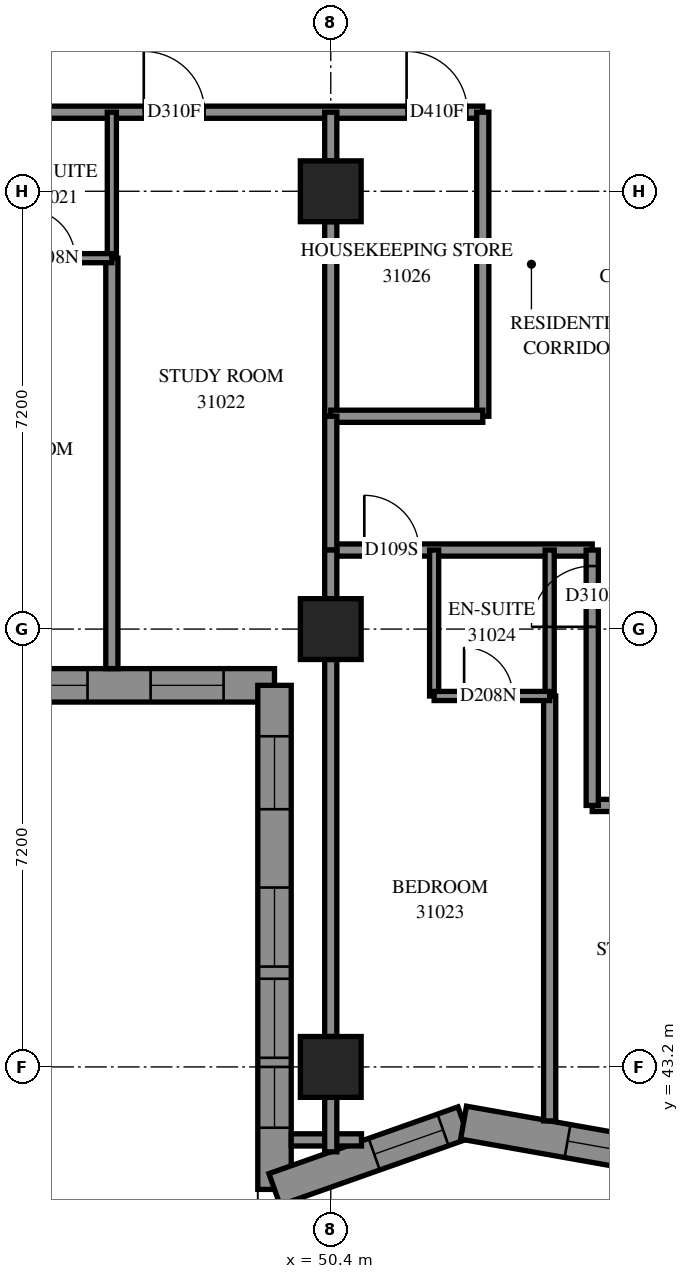
"""IFC4 building model, lengths in metres.
Left out: names, types, materials, properties, quantities, classifications, styles, units other than length and angle.
Written with IfcOpenShell. Run it as: python <this file> out.ifc"""

import sys

from ifc_helpers import new_model, si_unit, direction, frame, frame_2d, origin, origin_2d, place, context, subcontext, project, spatial, polyline, rectangle, outline, extrude, element, fill, save


model = new_model("IFC4")
c1 = context("Model", 3, precision=1e-05, world=origin(), true_north=direction((0.0, 1.0)))
c2 = subcontext(c1, "Body", "Model", "MODEL_VIEW")
j1 = project(units=[si_unit("LENGTHUNIT", "METRE"), si_unit("PLANEANGLEUNIT", "RADIAN")], contexts=[c1])
p1 = place(None, origin())
s1 = spatial("IfcSite", under=j1, at=p1, CompositionType="ELEMENT")
p2 = place(p1, origin())
s2 = spatial("IfcBuilding", under=s1, at=p2, CompositionType="ELEMENT")
p3 = place(p2, frame((0.0, 0.0, 115.2)))
s3 = spatial("IfcBuildingStorey", under=s2, at=p3, CompositionType="ELEMENT", Elevation=115.2)
for number, where, z_axis, x_axis in (
    (1, (50.4, 43.2, 0.0), (0.0, 0.0, 1.0), (1.0, 0.0, 0.0)),
    (2, (50.4, 50.4, 0.0), (0.0, 0.0, 1.0), (1.0, 0.0, 0.0)),
    (3, (50.4, 57.6, 0.0), (0.0, 0.0, 1.0), (1.0, 0.0, 0.0)),
):
    element("IfcColumn", number, at=place(p3, frame(where, z_axis=z_axis, x_axis=x_axis)), inside=s3, PredefinedType="COLUMN", context=c2, shape_type="SweptSolid", body=[
        extrude(rectangle(XDim=1.0, YDim=1.0, at=origin_2d()), origin(), (0.0, 0.0, 1.0), 3.1),
    ])
p4 = place(p3, frame((42.275, 49.475, 0.0), z_axis=(0.0, 0.0, 1.0), x_axis=(1.0, 0.0, 0.0)))
e4 = element("IfcWall", 4, at=p4, inside=s3, PredefinedType="SOLIDWALL", context=c2, shape_type="SweptSolid", body=[
    extrude(outline(polyline([(-0.275, -0.275), (6.925, -0.275), (7.475, 0.275), (0.275, 0.275), (-0.275, -0.275)])), origin(), (0.0, 0.0, 1.0), 3.1),
])
p5 = place(p4, frame((1.325, 0.0, 0.5)))
e5 = element("IfcOpeningElement", 5, at=p5, cuts=e4, PredefinedType="OPENING", context=c2, shape_type="SweptSolid", body=[
    extrude(rectangle(XDim=1.3, YDim=2.45, at=frame_2d((0.65, 1.225))), frame((0.0, 0.285, 0.0), z_axis=(0.0, -1.0, 0.0), x_axis=(1.0, 0.0, 0.0)), (0.0, 0.0, 1.0), 0.57),
])
p6 = place(p4, frame((2.825, 0.0, 0.5)))
e6 = element("IfcOpeningElement", 6, at=p6, cuts=e4, PredefinedType="OPENING", context=c2, shape_type="SweptSolid", body=[
    extrude(rectangle(XDim=1.3, YDim=2.45, at=frame_2d((0.65, 1.225))), frame((0.0, 0.285, 0.0), z_axis=(0.0, -1.0, 0.0), x_axis=(1.0, 0.0, 0.0)), (0.0, 0.0, 1.0), 0.57),
])
p7 = place(p4, frame((5.162, 0.0, 0.5)))
e7 = element("IfcOpeningElement", 7, at=p7, cuts=e4, PredefinedType="OPENING", context=c2, shape_type="SweptSolid", body=[
    extrude(rectangle(XDim=1.2, YDim=2.45, at=frame_2d((0.6, 1.225))), frame((0.0, 0.285, 0.0), z_axis=(0.0, -1.0, 0.0), x_axis=(1.0, 0.0, 0.0)), (0.0, 0.0, 1.0), 0.57),
])
p8 = place(p3, frame((49.475, 49.475, 0.0), z_axis=(0.0, 0.0, 1.0), x_axis=(0.0, -1.0, 0.0)))
e8 = element("IfcWall", 8, at=p8, inside=s3, PredefinedType="SOLIDWALL", context=c2, shape_type="SweptSolid", body=[
    extrude(outline(polyline([(0.275, -0.275), (8.678, -0.275), (7.901, 0.275), (-0.275, 0.275), (0.275, -0.275)])), origin(), (0.0, 0.0, 1.0), 3.1),
])
p9 = place(p8, frame((3.325, 0.0, 0.5)))
e9 = element("IfcOpeningElement", 9, at=p9, cuts=e8, PredefinedType="OPENING", context=c2, shape_type="SweptSolid", body=[
    extrude(rectangle(XDim=1.3, YDim=2.45, at=frame_2d((0.65, 1.225))), frame((0.0, 0.285, 0.0), z_axis=(0.0, -1.0, 0.0), x_axis=(1.0, 0.0, 0.0)), (0.0, 0.0, 1.0), 0.57),
])
p10 = place(p8, frame((4.825, 0.0, 0.5)))
e10 = element("IfcOpeningElement", 10, at=p10, cuts=e8, PredefinedType="OPENING", context=c2, shape_type="SweptSolid", body=[
    extrude(rectangle(XDim=1.3, YDim=2.45, at=frame_2d((0.65, 1.225))), frame((0.0, 0.285, 0.0), z_axis=(0.0, -1.0, 0.0), x_axis=(1.0, 0.0, 0.0)), (0.0, 0.0, 1.0), 0.57),
])
p11 = place(p8, frame((0.838, 0.0, 0.5)))
e11 = element("IfcOpeningElement", 11, at=p11, cuts=e8, PredefinedType="OPENING", context=c2, shape_type="SweptSolid", body=[
    extrude(rectangle(XDim=1.2, YDim=2.45, at=frame_2d((0.6, 1.225))), frame((0.0, 0.285, 0.0), z_axis=(0.0, -1.0, 0.0), x_axis=(1.0, 0.0, 0.0)), (0.0, 0.0, 1.0), 0.57),
])
p12 = place(p8, frame((6.275, 0.0, 0.45)))
e12 = element("IfcOpeningElement", 12, at=p12, cuts=e8, PredefinedType="OPENING", context=c2, shape_type="SweptSolid", body=[
    extrude(rectangle(XDim=1.0, YDim=2.5, at=frame_2d((0.5, 1.25))), frame((0.0, 0.285, 0.0), z_axis=(0.0, -1.0, 0.0), x_axis=(1.0, 0.0, 0.0)), (0.0, 0.0, 1.0), 0.57),
])
p13 = place(p3, frame((49.475, 41.186, 0.0), z_axis=(0.0, 0.0, 1.0), x_axis=(0.9429483298, 0.3329391044, 0.0)))
e13 = element("IfcWall", 13, at=p13, inside=s3, PredefinedType="SOLIDWALL", context=c2, shape_type="SweptSolid", body=[
    extrude(outline(polyline([(-0.389, -0.275), (3.225, -0.275), (3.369, 0.275), (0.389, 0.275), (-0.389, -0.275)])), origin(), (0.0, 0.0, 1.0), 3.1),
])
p14 = place(p13, frame((1.739, 0.0, 0.5)))
e14 = element("IfcOpeningElement", 14, at=p14, cuts=e13, PredefinedType="OPENING", context=c2, shape_type="SweptSolid", body=[
    extrude(rectangle(XDim=1.2, YDim=2.45, at=frame_2d((0.6, 1.225))), frame((0.0, 0.285, 0.0), z_axis=(0.0, -1.0, 0.0), x_axis=(1.0, 0.0, 0.0)), (0.0, 0.0, 1.0), 0.57),
])
p15 = place(p3, frame((52.584, 42.283, 0.0), z_axis=(0.0, 0.0, 1.0), x_axis=(0.9846990638, -0.1742634606, 0.0)))
e15 = element("IfcWall", 15, at=p15, inside=s3, PredefinedType="SOLIDWALL", context=c2, shape_type="SweptSolid", body=[
    extrude(outline(polyline([(0.072, -0.275), (3.533, -0.275), (3.435, 0.275), (-0.072, 0.275), (0.072, -0.275)])), origin(), (0.0, 0.0, 1.0), 3.1),
])
p16 = place(p15, frame((1.737, 0.0, 0.5)))
e16 = element("IfcOpeningElement", 16, at=p16, cuts=e15, PredefinedType="OPENING", context=c2, shape_type="SweptSolid", body=[
    extrude(rectangle(XDim=1.2, YDim=2.45, at=frame_2d((0.6, 1.225))), frame((0.0, 0.285, 0.0), z_axis=(0.0, -1.0, 0.0), x_axis=(1.0, 0.0, 0.0)), (0.0, 0.0, 1.0), 0.57),
])
p17 = place(p3, frame((28.802, 58.9, 0.0), z_axis=(0.0, 0.0, 1.0), x_axis=(1.0, 0.0, 0.0)))
e17 = element("IfcWall", 17, at=p17, inside=s3, PredefinedType="PARTITIONING", context=c2, shape_type="SweptSolid", body=[
    extrude(rectangle(XDim=24.098, YDim=0.2, at=frame_2d((12.049, 0.0))), origin(), (0.0, 0.0, 1.0), 3.1),
])
p18 = place(p17, frame((11.323, 0.0, 0.0)))
e18 = element("IfcOpeningElement", 18, at=p18, cuts=e17, PredefinedType="OPENING", context=c2, shape_type="SweptSolid", body=[
    extrude(rectangle(XDim=1.0, YDim=2.1, at=frame_2d((0.5, 1.05))), frame((0.0, 0.11, 0.0), z_axis=(0.0, -1.0, 0.0), x_axis=(1.0, 0.0, 0.0)), (0.0, 0.0, 1.0), 0.22),
])
p19 = place(p17, frame((14.908, 0.0, 0.0)))
e19 = element("IfcOpeningElement", 19, at=p19, cuts=e17, PredefinedType="OPENING", context=c2, shape_type="SweptSolid", body=[
    extrude(rectangle(XDim=0.9, YDim=2.1, at=frame_2d((0.45, 1.05))), frame((0.0, 0.11, 0.0), z_axis=(0.0, -1.0, 0.0), x_axis=(1.0, 0.0, 0.0)), (0.0, 0.0, 1.0), 0.22),
])
p20 = place(p17, frame((18.523, 0.0, 0.0)))
e20 = element("IfcOpeningElement", 20, at=p20, cuts=e17, PredefinedType="OPENING", context=c2, shape_type="SweptSolid", body=[
    extrude(rectangle(XDim=1.0, YDim=2.1, at=frame_2d((0.5, 1.05))), frame((0.0, 0.11, 0.0), z_axis=(0.0, -1.0, 0.0), x_axis=(1.0, 0.0, 0.0)), (0.0, 0.0, 1.0), 0.22),
])
p21 = place(p17, frame((22.845, 0.0, 0.0)))
e21 = element("IfcOpeningElement", 21, at=p21, cuts=e17, PredefinedType="OPENING", context=c2, shape_type="SweptSolid", body=[
    extrude(rectangle(XDim=1.0, YDim=2.1, at=frame_2d((0.5, 1.05))), frame((0.0, 0.11, 0.0), z_axis=(0.0, -1.0, 0.0), x_axis=(1.0, 0.0, 0.0)), (0.0, 0.0, 1.0), 0.22),
])
p22 = place(p3, frame((54.7, 47.5, 0.0), z_axis=(0.0, 0.0, 1.0), x_axis=(1.0, 0.0, 0.0)))
e22 = element("IfcWall", 22, at=p22, inside=s3, PredefinedType="PARTITIONING", context=c2, shape_type="SweptSolid", body=[
    extrude(rectangle(XDim=19.442, YDim=0.2, at=frame_2d((9.721, 0.0))), origin(), (0.0, 0.0, 1.0), 3.1),
])
p23 = place(p22, frame((5.2, 0.0, 0.0)))
e23 = element("IfcOpeningElement", 23, at=p23, cuts=e22, PredefinedType="OPENING", context=c2, shape_type="SweptSolid", body=[
    extrude(rectangle(XDim=0.9, YDim=2.1, at=frame_2d((0.45, 1.05))), frame((0.0, 0.11, 0.0), z_axis=(0.0, -1.0, 0.0), x_axis=(1.0, 0.0, 0.0)), (0.0, 0.0, 1.0), 0.22),
])
p24 = place(p22, frame((8.757, 0.0, 0.0)))
e24 = element("IfcOpeningElement", 24, at=p24, cuts=e22, PredefinedType="OPENING", context=c2, shape_type="SweptSolid", body=[
    extrude(rectangle(XDim=0.9, YDim=2.1, at=frame_2d((0.45, 1.05))), frame((0.0, 0.11, 0.0), z_axis=(0.0, -1.0, 0.0), x_axis=(1.0, 0.0, 0.0)), (0.0, 0.0, 1.0), 0.22),
])
p25 = place(p22, frame((14.05, 0.0, 0.0)))
e25 = element("IfcOpeningElement", 25, at=p25, cuts=e22, PredefinedType="OPENING", context=c2, shape_type="SweptSolid", body=[
    extrude(rectangle(XDim=0.9, YDim=2.1, at=frame_2d((0.45, 1.05))), frame((0.0, 0.11, 0.0), z_axis=(0.0, -1.0, 0.0), x_axis=(1.0, 0.0, 0.0)), (0.0, 0.0, 1.0), 0.22),
])
p26 = place(p3, frame((54.0, 42.312, 0.0), z_axis=(0.0, 0.0, 1.0), x_axis=(0.0, 1.0, 0.0)))
e26 = element("IfcWall", 26, at=p26, inside=s3, PredefinedType="PARTITIONING", context=c2, shape_type="SweptSolid", body=[
    extrude(rectangle(XDim=6.988, YDim=0.2, at=frame_2d((3.494, 0.0))), origin(), (0.0, 0.0, 1.0), 3.1),
])
p27 = place(p3, frame((46.8, 49.75, 0.0), z_axis=(0.0, 0.0, 1.0), x_axis=(0.0, 1.0, 0.0)))
e27 = element("IfcWall", 27, at=p27, inside=s3, PredefinedType="PARTITIONING", context=c2, shape_type="SweptSolid", body=[
    extrude(rectangle(XDim=6.75, YDim=0.2, at=frame_2d((3.375, 0.0))), origin(), (0.0, 0.0, 1.0), 3.1),
])
p28 = place(p3, frame((50.4, 43.7, 0.0), z_axis=(0.0, 0.0, 1.0), x_axis=(0.0, 1.0, 0.0)))
e28 = element("IfcWall", 28, at=p28, inside=s3, PredefinedType="PARTITIONING", context=c2, shape_type="SweptSolid", body=[
    extrude(rectangle(XDim=6.2, YDim=0.2, at=frame_2d((3.1, 0.0))), origin(), (0.0, 0.0, 1.0), 2.6),
])
p29 = place(p3, frame((52.9, 53.9, 0.0), z_axis=(0.0, 0.0, 1.0), x_axis=(0.0, 1.0, 0.0)))
e29 = element("IfcWall", 29, at=p29, inside=s3, PredefinedType="PARTITIONING", context=c2, shape_type="SweptSolid", body=[
    extrude(rectangle(XDim=5.0, YDim=0.2, at=frame_2d((2.5, 0.0))), origin(), (0.0, 0.0, 1.0), 3.1),
])
p30 = place(p3, frame((50.4, 51.7, 0.0), z_axis=(0.0, 0.0, 1.0), x_axis=(1.0, 0.0, 0.0)))
e30 = element("IfcWall", 30, at=p30, inside=s3, PredefinedType="PARTITIONING", context=c2, shape_type="SweptSolid", body=[
    extrude(rectangle(XDim=4.3, YDim=0.2, at=frame_2d((2.15, 0.0))), origin(), (0.0, 0.0, 1.0), 3.1),
])
p31 = place(p30, frame((0.552, 0.0, 0.0)))
e31 = element("IfcOpeningElement", 31, at=p31, cuts=e30, PredefinedType="OPENING", context=c2, shape_type="SweptSolid", body=[
    extrude(rectangle(XDim=0.9, YDim=2.1, at=frame_2d((0.45, 1.05))), frame((0.0, 0.11, 0.0), z_axis=(0.0, -1.0, 0.0), x_axis=(1.0, 0.0, 0.0)), (0.0, 0.0, 1.0), 0.22),
])
p32 = place(p3, frame((54.7, 47.5, 0.0), z_axis=(0.0, 0.0, 1.0), x_axis=(0.0, 1.0, 0.0)))
e32 = element("IfcWall", 32, at=p32, inside=s3, PredefinedType="PARTITIONING", context=c2, shape_type="SweptSolid", body=[
    extrude(rectangle(XDim=4.2, YDim=0.2, at=frame_2d((2.1, 0.0))), origin(), (0.0, 0.0, 1.0), 3.1),
])
p33 = place(p32, frame((2.937, 0.0, 0.0)))
e33 = element("IfcOpeningElement", 33, at=p33, cuts=e32, PredefinedType="OPENING", context=c2, shape_type="SweptSolid", body=[
    extrude(rectangle(XDim=1.0, YDim=2.1, at=frame_2d((0.5, 1.05))), frame((0.0, 0.11, 0.0), z_axis=(0.0, -1.0, 0.0), x_axis=(1.0, 0.0, 0.0)), (0.0, 0.0, 1.0), 0.22),
])
p34 = place(p3, frame((50.4, 53.9, 0.0), z_axis=(0.0, 0.0, 1.0), x_axis=(0.0, 1.0, 0.0)))
e34 = element("IfcWall", 34, at=p34, inside=s3, PredefinedType="PARTITIONING", context=c2, shape_type="SweptSolid", body=[
    extrude(rectangle(XDim=3.2, YDim=0.2, at=frame_2d((1.6, 0.0))), origin(), (0.0, 0.0, 1.0), 3.1),
])
p35 = place(p3, frame((50.4, 53.9, 0.0), z_axis=(0.0, 0.0, 1.0), x_axis=(1.0, 0.0, 0.0)))
e35 = element("IfcWall", 35, at=p35, inside=s3, PredefinedType="PARTITIONING", context=c2, shape_type="SweptSolid", body=[
    extrude(rectangle(XDim=2.5, YDim=0.2, at=frame_2d((1.25, 0.0))), origin(), (0.0, 0.0, 1.0), 3.1),
])
for number, where, z_axis, x_axis in (
    (36, (52.1, 49.3, 0.0), (0.0, 0.0, 1.0), (0.0, 1.0, 0.0)),
    (37, (54.0, 49.3, 0.0), (0.0, 0.0, 1.0), (0.0, 1.0, 0.0)),
    (38, (46.8, 56.5, 0.0), (0.0, 0.0, 1.0), (0.0, 1.0, 0.0)),
):
    element("IfcWall", number, at=place(p3, frame(where, z_axis=z_axis, x_axis=x_axis)), inside=s3, PredefinedType="PARTITIONING", context=c2, shape_type="SweptSolid", body=[
        extrude(rectangle(XDim=2.4, YDim=0.15, at=frame_2d((1.2, 0.0))), origin(), (0.0, 0.0, 1.0), 3.1),
    ])
p36 = place(p3, frame((50.4, 51.7, 0.0), z_axis=(0.0, 0.0, 1.0), x_axis=(0.0, 1.0, 0.0)))
e39 = element("IfcWall", 39, at=p36, inside=s3, PredefinedType="PARTITIONING", context=c2, shape_type="SweptSolid", body=[
    extrude(rectangle(XDim=2.2, YDim=0.2, at=frame_2d((1.1, 0.0))), origin(), (0.0, 0.0, 1.0), 3.1),
])
p37 = place(p3, frame((44.9, 56.5, 0.0), z_axis=(0.0, 0.0, 1.0), x_axis=(1.0, 0.0, 0.0)))
e40 = element("IfcWall", 40, at=p37, inside=s3, PredefinedType="PARTITIONING", context=c2, shape_type="SweptSolid", body=[
    extrude(rectangle(XDim=1.9, YDim=0.15, at=frame_2d((0.95, 0.0))), origin(), (0.0, 0.0, 1.0), 3.1),
])
p38 = place(p37, frame((0.493, 0.0, 0.0)))
e41 = element("IfcOpeningElement", 41, at=p38, cuts=e40, PredefinedType="OPENING", context=c2, shape_type="SweptSolid", body=[
    extrude(rectangle(XDim=0.8, YDim=2.1, at=frame_2d((0.4, 1.05))), frame((0.0, 0.085, 0.0), z_axis=(0.0, -1.0, 0.0), x_axis=(1.0, 0.0, 0.0)), (0.0, 0.0, 1.0), 0.17),
])
p39 = place(p3, frame((52.1, 49.3, 0.0), z_axis=(0.0, 0.0, 1.0), x_axis=(1.0, 0.0, 0.0)))
e42 = element("IfcWall", 42, at=p39, inside=s3, PredefinedType="PARTITIONING", context=c2, shape_type="SweptSolid", body=[
    extrude(rectangle(XDim=1.9, YDim=0.15, at=frame_2d((0.95, 0.0))), origin(), (0.0, 0.0, 1.0), 3.1),
])
p40 = place(p39, frame((0.493, 0.0, 0.0)))
e43 = element("IfcOpeningElement", 43, at=p40, cuts=e42, PredefinedType="OPENING", context=c2, shape_type="SweptSolid", body=[
    extrude(rectangle(XDim=0.8, YDim=2.1, at=frame_2d((0.4, 1.05))), frame((0.0, 0.085, 0.0), z_axis=(0.0, -1.0, 0.0), x_axis=(1.0, 0.0, 0.0)), (0.0, 0.0, 1.0), 0.17),
])
p41 = place(p3, frame((49.75, 42.0, 0.0), z_axis=(0.0, 0.0, 1.0), x_axis=(1.0, 0.0, 0.0)))
e44 = element("IfcWall", 44, at=p41, inside=s3, PredefinedType="PARTITIONING", context=c2, shape_type="SweptSolid", body=[
    extrude(rectangle(XDim=1.155, YDim=0.2, at=frame_2d((0.578, 0.0))), origin(), (0.0, 0.0, 1.0), 3.1),
])
for number, where, z_axis, x_axis in (
    (45, (50.4, 50.9, 0.0), (0.0, 0.0, 1.0), (0.0, 1.0, 0.0)),
    (46, (50.4, 58.1, 0.0), (0.0, 0.0, 1.0), (0.0, 1.0, 0.0)),
):
    element("IfcWall", number, at=place(p3, frame(where, z_axis=z_axis, x_axis=x_axis)), inside=s3, PredefinedType="PARTITIONING", context=c2, shape_type="SweptSolid", body=[
        extrude(rectangle(XDim=0.8, YDim=0.2, at=frame_2d((0.4, 0.0))), origin(), (0.0, 0.0, 1.0), 3.1),
    ])
p42 = place(p3, frame((50.4, 41.804, 0.0), z_axis=(0.0, 0.0, 1.0), x_axis=(0.0, 1.0, 0.0)))
e47 = element("IfcWall", 47, at=p42, inside=s3, PredefinedType="PARTITIONING", context=c2, shape_type="SweptSolid", body=[
    extrude(rectangle(XDim=0.896, YDim=0.2, at=frame_2d((0.448, 0.0))), origin(), (0.0, 0.0, 1.0), 3.1),
])
p43 = place(p6, origin())
e48 = element("IfcWindow", 48, at=p43, inside=s3, PartitioningType="SINGLE_PANEL", PredefinedType="WINDOW", context=c2, shape_type="SweptSolid", body=[
    extrude(rectangle(XDim=1.3, YDim=2.45, at=frame_2d((0.65, 1.225))), frame((0.0, 0.155, 0.0), z_axis=(0.0, -1.0, 0.0), x_axis=(1.0, 0.0, 0.0)), (0.0, 0.0, 1.0), 0.06),
])
fill(e6, e48)
p44 = place(p7, origin())
e49 = element("IfcWindow", 49, at=p44, inside=s3, PartitioningType="SINGLE_PANEL", PredefinedType="WINDOW", context=c2, shape_type="SweptSolid", body=[
    extrude(rectangle(XDim=1.2, YDim=2.45, at=frame_2d((0.6, 1.225))), frame((0.0, 0.155, 0.0), z_axis=(0.0, -1.0, 0.0), x_axis=(1.0, 0.0, 0.0)), (0.0, 0.0, 1.0), 0.06),
])
fill(e7, e49)
p45 = place(p9, origin())
e50 = element("IfcWindow", 50, at=p45, inside=s3, PartitioningType="SINGLE_PANEL", PredefinedType="WINDOW", context=c2, shape_type="SweptSolid", body=[
    extrude(rectangle(XDim=1.3, YDim=2.45, at=frame_2d((0.65, 1.225))), frame((0.0, 0.155, 0.0), z_axis=(0.0, -1.0, 0.0), x_axis=(1.0, 0.0, 0.0)), (0.0, 0.0, 1.0), 0.06),
])
fill(e9, e50)
p46 = place(p10, origin())
e51 = element("IfcWindow", 51, at=p46, inside=s3, PartitioningType="SINGLE_PANEL", PredefinedType="WINDOW", context=c2, shape_type="SweptSolid", body=[
    extrude(rectangle(XDim=1.3, YDim=2.45, at=frame_2d((0.65, 1.225))), frame((0.0, 0.155, 0.0), z_axis=(0.0, -1.0, 0.0), x_axis=(1.0, 0.0, 0.0)), (0.0, 0.0, 1.0), 0.06),
])
fill(e10, e51)
p47 = place(p11, origin())
e52 = element("IfcWindow", 52, at=p47, inside=s3, PartitioningType="SINGLE_PANEL", PredefinedType="WINDOW", context=c2, shape_type="SweptSolid", body=[
    extrude(rectangle(XDim=1.2, YDim=2.45, at=frame_2d((0.6, 1.225))), frame((0.0, 0.155, 0.0), z_axis=(0.0, -1.0, 0.0), x_axis=(1.0, 0.0, 0.0)), (0.0, 0.0, 1.0), 0.06),
])
fill(e11, e52)
p48 = place(p14, origin())
e53 = element("IfcWindow", 53, at=p48, inside=s3, PartitioningType="SINGLE_PANEL", PredefinedType="WINDOW", context=c2, shape_type="SweptSolid", body=[
    extrude(rectangle(XDim=1.2, YDim=2.45, at=frame_2d((0.6, 1.225))), frame((0.0, 0.155, 0.0), z_axis=(0.0, -1.0, 0.0), x_axis=(1.0, 0.0, 0.0)), (0.0, 0.0, 1.0), 0.06),
])
fill(e14, e53)
p49 = place(p16, origin())
e54 = element("IfcWindow", 54, at=p49, inside=s3, PartitioningType="SINGLE_PANEL", PredefinedType="WINDOW", context=c2, shape_type="SweptSolid", body=[
    extrude(rectangle(XDim=1.2, YDim=2.45, at=frame_2d((0.6, 1.225))), frame((0.0, 0.155, 0.0), z_axis=(0.0, -1.0, 0.0), x_axis=(1.0, 0.0, 0.0)), (0.0, 0.0, 1.0), 0.06),
])
fill(e16, e54)
p50 = place(p38, origin())
e55 = element("IfcDoor", 55, at=p50, inside=s3, OperationType="SINGLE_SWING_RIGHT", PredefinedType="DOOR", context=c2, shape_type="SweptSolid", body=[
    extrude(rectangle(XDim=0.8, YDim=2.1, at=frame_2d((0.4, 1.05))), frame((0.0, 0.025, 0.0), z_axis=(0.0, -1.0, 0.0), x_axis=(1.0, 0.0, 0.0)), (0.0, 0.0, 1.0), 0.05),
])
fill(e41, e55)
p51 = place(p20, origin())
e56 = element("IfcDoor", 56, at=p51, inside=s3, OperationType="SINGLE_SWING_RIGHT", PredefinedType="DOOR", context=c2, shape_type="SweptSolid", body=[
    extrude(rectangle(XDim=1.0, YDim=2.1, at=frame_2d((0.5, 1.05))), frame((0.0, 0.025, 0.0), z_axis=(0.0, -1.0, 0.0), x_axis=(1.0, 0.0, 0.0)), (0.0, 0.0, 1.0), 0.05),
])
fill(e20, e56)
p52 = place(p31, origin())
e57 = element("IfcDoor", 57, at=p52, inside=s3, OperationType="SINGLE_SWING_LEFT", PredefinedType="DOOR", context=c2, shape_type="SweptSolid", body=[
    extrude(rectangle(XDim=0.9, YDim=2.1, at=frame_2d((0.45, 1.05))), frame((0.0, 0.025, 0.0), z_axis=(0.0, -1.0, 0.0), x_axis=(1.0, 0.0, 0.0)), (0.0, 0.0, 1.0), 0.05),
])
fill(e31, e57)
p53 = place(p40, origin())
e58 = element("IfcDoor", 58, at=p53, inside=s3, OperationType="SINGLE_SWING_RIGHT", PredefinedType="DOOR", context=c2, shape_type="SweptSolid", body=[
    extrude(rectangle(XDim=0.8, YDim=2.1, at=frame_2d((0.4, 1.05))), frame((0.0, 0.025, 0.0), z_axis=(0.0, -1.0, 0.0), x_axis=(1.0, 0.0, 0.0)), (0.0, 0.0, 1.0), 0.05),
])
fill(e43, e58)
p54 = place(p33, origin())
e59 = element("IfcDoor", 59, at=p54, inside=s3, OperationType="SINGLE_SWING_RIGHT", PredefinedType="DOOR", context=c2, shape_type="SweptSolid", body=[
    extrude(rectangle(XDim=1.0, YDim=2.1, at=frame_2d((0.5, 1.05))), frame((0.0, 0.025, 0.0), z_axis=(0.0, -1.0, 0.0), x_axis=(1.0, 0.0, 0.0)), (0.0, 0.0, 1.0), 0.05),
])
fill(e33, e59)
p55 = place(p21, origin())
e60 = element("IfcDoor", 60, at=p55, inside=s3, OperationType="SINGLE_SWING_LEFT", PredefinedType="DOOR", context=c2, shape_type="SweptSolid", body=[
    extrude(rectangle(XDim=1.0, YDim=2.1, at=frame_2d((0.5, 1.05))), frame((0.0, 0.025, 0.0), z_axis=(0.0, -1.0, 0.0), x_axis=(1.0, 0.0, 0.0)), (0.0, 0.0, 1.0), 0.05),
])
fill(e21, e60)
p56 = place(p12, origin())
e61 = element("IfcWindow", 61, at=p56, inside=s3, PartitioningType="SINGLE_PANEL", PredefinedType="WINDOW", context=c2, shape_type="SweptSolid", body=[
    extrude(rectangle(XDim=1.0, YDim=2.5, at=frame_2d((0.5, 1.25))), frame((0.0, 0.155, 0.0), z_axis=(0.0, -1.0, 0.0), x_axis=(1.0, 0.0, 0.0)), (0.0, 0.0, 1.0), 0.06),
])
fill(e12, e61)
save(model, sys.argv[1])
